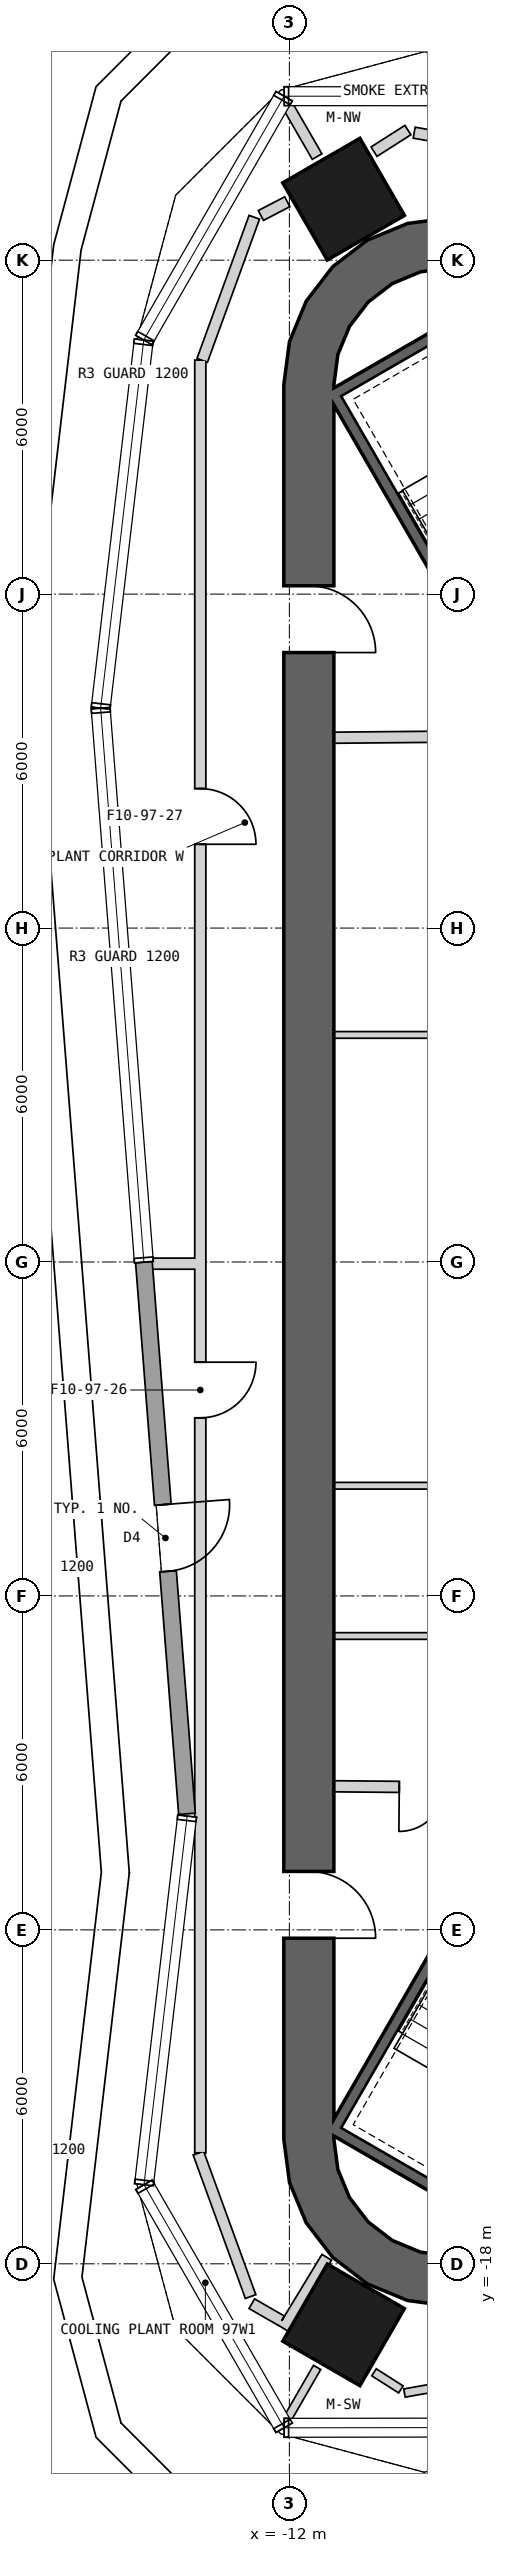
"""IFC4 building model, lengths in metres.
Left out: names, types, materials, properties, quantities, classifications, styles, units other than length and angle.
Written with IfcOpenShell. Run it as: python <this file> out.ifc"""

import sys

from ifc_helpers import new_model, si_unit, direction, frame, frame_2d, origin, origin_2d, place, context, subcontext, project, spatial, polyline, rectangle, outline, extrude, element, fill, save


model = new_model("IFC4")
c1 = context("Model", 3, precision=1e-05, world=origin(), true_north=direction((0.0, 1.0)))
c2 = subcontext(c1, "Body", "Model", "MODEL_VIEW")
j1 = project(units=[si_unit("LENGTHUNIT", "METRE"), si_unit("PLANEANGLEUNIT", "RADIAN")], contexts=[c1])
p1 = place(None, origin())
s1 = spatial("IfcSite", under=j1, at=p1, CompositionType="ELEMENT")
p2 = place(p1, origin())
s2 = spatial("IfcBuilding", under=s1, at=p2, CompositionType="ELEMENT")
p3 = place(p2, frame((0.0, 0.0, 430.3)))
s3 = spatial("IfcBuildingStorey", under=s2, at=p3, CompositionType="ELEMENT", Elevation=430.3)
for number, where, z_axis, x_axis in (
    (1, (-11.025, 19.097, 0.0), (0.0, 0.0, 1.0), (-0.5, 0.866, 0.0)),
    (2, (-11.025, -19.097, 0.0), (0.0, 0.0, 1.0), (-0.5, -0.866, 0.0)),
):
    element("IfcColumn", number, at=place(p3, frame(where, z_axis=z_axis, x_axis=x_axis)), inside=s3, PredefinedType="COLUMN", context=c2, shape_type="SweptSolid", body=[
        extrude(rectangle(XDim=1.6, YDim=1.6, at=origin_2d()), origin(), (0.0, 0.0, 1.0), 5.0),
    ])
p4 = place(p3, frame((-11.65, 15.762, 0.0), z_axis=(0.0, 0.0, 1.0), x_axis=(0.0, -1.0, 0.0)))
e3 = element("IfcWall", 3, at=p4, inside=s3, PredefinedType="SHEAR", context=c2, shape_type="SweptSolid", body=[
    extrude(rectangle(XDim=31.523, YDim=0.9, at=frame_2d((15.762, 0.0))), origin(), (0.0, 0.0, 1.0), 5.0),
])
p5 = place(p4, frame((3.612, 0.0, 0.0)))
e4 = element("IfcOpeningElement", 4, at=p5, cuts=e3, PredefinedType="OPENING", context=c2, shape_type="SweptSolid", body=[
    extrude(rectangle(XDim=1.2, YDim=2.4, at=frame_2d((0.6, 1.2))), frame((0.0, 0.46, 0.0), z_axis=(0.0, -1.0, 0.0), x_axis=(1.0, 0.0, 0.0)), (0.0, 0.0, 1.0), 0.92),
])
p6 = place(p4, frame((26.712, 0.0, 0.0)))
e5 = element("IfcOpeningElement", 5, at=p6, cuts=e3, PredefinedType="OPENING", context=c2, shape_type="SweptSolid", body=[
    extrude(rectangle(XDim=1.2, YDim=2.4, at=frame_2d((0.6, 1.2))), frame((0.0, 0.46, 0.0), z_axis=(0.0, -1.0, 0.0), x_axis=(1.0, 0.0, 0.0)), (0.0, 0.0, 1.0), 0.92),
])
p7 = place(p3, origin())
e6 = element("IfcWall", 6, at=p7, inside=s3, PredefinedType="SHEAR", context=c2, shape_type="SweptSolid", body=[
    extrude(outline(polyline([(-7.6, 18.36), (-8.323, 18.659), (-9.1, 18.762), (-9.876, 18.659), (-10.6, 18.36), (-11.221, 17.883), (-11.698, 17.262), (-11.998, 16.538), (-12.1, 15.762), (-11.2, 15.762), (-11.128, 16.305), (-10.919, 16.812), (-10.585, 17.247), (-10.15, 17.58), (-9.644, 17.79), (-9.1, 17.862), (-8.556, 17.79), (-8.05, 17.58), (-7.6, 18.36)])), origin(), (0.0, 0.0, 1.0), 5.0),
])
p8 = place(p3, origin())
e7 = element("IfcWall", 7, at=p8, inside=s3, PredefinedType="SHEAR", context=c2, shape_type="SweptSolid", body=[
    extrude(outline(polyline([(-12.1, -15.762), (-11.998, -16.538), (-11.698, -17.262), (-11.221, -17.883), (-10.6, -18.36), (-9.876, -18.659), (-9.1, -18.762), (-8.323, -18.659), (-7.6, -18.36), (-8.05, -17.58), (-8.556, -17.79), (-9.1, -17.862), (-9.644, -17.79), (-10.15, -17.58), (-10.585, -17.247), (-10.919, -16.812), (-11.128, -16.305), (-11.2, -15.762), (-12.1, -15.762)])), origin(), (0.0, 0.0, 1.0), 5.0),
])
p9 = place(p3, frame((-14.614, -0.002, 0.0), z_axis=(0.0, 0.0, 1.0), x_axis=(0.077860592968, -0.996964256161, 0.0)))
e8 = element("IfcWall", 8, at=p9, inside=s3, PredefinedType="SOLIDWALL", context=c2, shape_type="SweptSolid", body=[
    extrude(rectangle(XDim=9.943, YDim=0.3, at=frame_2d((4.972, 0.0))), origin(), (0.0, 0.0, 1.0), 4.75),
])
p10 = place(p9, frame((4.372, 0.0, 0.0)))
e9 = element("IfcOpeningElement", 9, at=p10, cuts=e8, PredefinedType="OPENING", context=c2, shape_type="SweptSolid", body=[
    extrude(rectangle(XDim=1.2, YDim=2.4, at=frame_2d((0.6, 1.2))), frame((0.0, 0.16, 0.0), z_axis=(0.0, -1.0, 0.0), x_axis=(1.0, 0.0, 0.0)), (0.0, 0.0, 1.0), 0.32),
])
p11 = place(p3, frame((-11.245, 15.678, -0.25), z_axis=(0.0, 0.0, 1.0), x_axis=(0.499977274689, -0.866038523851, 0.0)))
e10 = element("IfcWall", 10, at=p11, inside=s3, PredefinedType="SHEAR", context=c2, shape_type="SweptSolid", body=[
    extrude(rectangle(XDim=8.1, YDim=0.2, at=frame_2d((4.05, 0.0))), origin(), (0.0, 0.0, 1.0), 5.0),
])
for number, where, z_axis, x_axis in (
    (11, (-7.818, 17.541, -0.25), (0.0, 0.0, 1.0), (-0.866, -0.5, 0.0)),
    (12, (-11.282, -15.541, -0.25), (0.0, 0.0, 1.0), (0.866, -0.5, 0.0)),
):
    element("IfcWall", number, at=place(p3, frame(where, z_axis=z_axis, x_axis=x_axis)), inside=s3, PredefinedType="SHEAR", context=c2, shape_type="SweptSolid", body=[
        extrude(rectangle(XDim=3.8, YDim=0.2, at=frame_2d((1.9, 0.0))), origin(), (0.0, 0.0, 1.0), 5.0),
    ])
p12 = place(p3, frame((-7.196, -8.663, -0.25), z_axis=(0.0, 0.0, 1.0), x_axis=(-0.499997992926, -0.866026562566, 0.0)))
e13 = element("IfcWall", 13, at=p12, inside=s3, PredefinedType="SHEAR", context=c2, shape_type="SweptSolid", body=[
    extrude(rectangle(XDim=7.9, YDim=0.2, at=frame_2d((3.95, 0.0))), origin(), (0.0, 0.0, 1.0), 5.0),
])
p13 = place(p3, frame((-7.95, 4.08, 0.0), z_axis=(0.0, 0.0, 1.0), x_axis=(-1.0, 0.0, 0.0)))
e14 = element("IfcWall", 14, at=p13, inside=s3, PredefinedType="PARTITIONING", context=c2, shape_type="SweptSolid", body=[
    extrude(rectangle(XDim=3.25, YDim=0.12, at=frame_2d((1.625, 0.0))), origin(), (0.0, 0.0, 1.0), 4.75),
])
p14 = place(p3, frame((-7.85, 9.451, 0.0), z_axis=(0.0, 0.0, 1.0), x_axis=(-0.999957167047, -0.009255488683, 0.0)))
e15 = element("IfcWall", 15, at=p14, inside=s3, PredefinedType="PARTITIONING", context=c2, shape_type="SweptSolid", body=[
    extrude(rectangle(XDim=3.35, YDim=0.2, at=frame_2d((1.675, 0.0))), origin(), (0.0, 0.0, 1.0), 4.75),
])
for number, where, z_axis, x_axis in (
    (16, (-11.2, -4.02, 0.0), (0.0, 0.0, 1.0), (1.0, 0.0, 0.0)),
    (17, (-11.2, -6.72, 0.0), (0.0, 0.0, 1.0), (1.0, 0.0, 0.0)),
):
    element("IfcWall", number, at=place(p3, frame(where, z_axis=z_axis, x_axis=x_axis)), inside=s3, PredefinedType="PARTITIONING", context=c2, shape_type="SweptSolid", body=[
        extrude(rectangle(XDim=3.25, YDim=0.12, at=frame_2d((1.625, 0.0))), origin(), (0.0, 0.0, 1.0), 4.75),
    ])
p15 = place(p3, frame((-11.2, -9.42, 0.0), z_axis=(0.0, 0.0, 1.0), x_axis=(0.999957467379, -0.009222983926, 0.0)))
e18 = element("IfcWall", 18, at=p15, inside=s3, PredefinedType="PARTITIONING", context=c2, shape_type="SweptSolid", body=[
    extrude(rectangle(XDim=3.15, YDim=0.2, at=frame_2d((1.575, 0.0))), origin(), (0.0, 0.0, 1.0), 4.75),
])
p16 = place(p15, frame((1.175, 0.0, 0.0)))
e19 = element("IfcOpeningElement", 19, at=p16, cuts=e18, PredefinedType="OPENING", context=c2, shape_type="SweptSolid", body=[
    extrude(rectangle(XDim=0.8, YDim=2.1, at=frame_2d((0.4, 1.05))), frame((0.0, 0.11, 0.0), z_axis=(0.0, -1.0, 0.0), x_axis=(1.0, 0.0, 0.0)), (0.0, 0.0, 1.0), 0.22),
])
p17 = place(p3, frame((-12.104, -19.161, 0.0), z_axis=(0.0, 0.0, 1.0), x_axis=(0.518475368733, 0.855092563421, 0.0)))
e20 = element("IfcWall", 20, at=p17, inside=s3, PredefinedType="PARTITIONING", context=c2, shape_type="SweptSolid", body=[
    extrude(rectangle(XDim=1.496, YDim=0.2, at=frame_2d((0.748, 0.0))), origin(), (0.0, 0.0, 1.0), 4.75),
])
p18 = place(p3, frame((-12.675, -18.717, 0.0), z_axis=(0.0, 0.0, 1.0), x_axis=(0.866047486323, -0.49996174997, 0.0)))
e21 = element("IfcWall", 21, at=p18, inside=s3, PredefinedType="PARTITIONING", context=c2, shape_type="SweptSolid", body=[
    extrude(rectangle(XDim=0.618, YDim=0.2, at=frame_2d((0.309, 0.0))), origin(), (0.0, 0.0, 1.0), 4.75),
])
p19 = place(p3, frame((-13.634, -16.011, 0.0), z_axis=(0.0, 0.0, 1.0), x_axis=(0.342043269434, -0.939684203248, 0.0)))
e22 = element("IfcWall", 22, at=p19, inside=s3, PredefinedType="PARTITIONING", context=c2, shape_type="SweptSolid", body=[
    extrude(rectangle(XDim=2.742, YDim=0.2, at=frame_2d((1.371, 0.0))), origin(), (0.0, 0.0, 1.0), 4.75),
])
p20 = place(p3, frame((-13.6, 16.206, 0.0), z_axis=(0.0, 0.0, 1.0), x_axis=(0.0, -1.0, 0.0)))
e23 = element("IfcWall", 23, at=p20, inside=s3, PredefinedType="PARTITIONING", context=c2, shape_type="SweptSolid", body=[
    extrude(rectangle(XDim=16.256, YDim=0.2, at=frame_2d((8.128, 0.0))), origin(), (0.0, 0.0, 1.0), 4.75),
])
p21 = place(p20, frame((7.7, 0.0, 0.0)))
e24 = element("IfcOpeningElement", 24, at=p21, cuts=e23, PredefinedType="OPENING", context=c2, shape_type="SweptSolid", body=[
    extrude(rectangle(XDim=1.0, YDim=2.1, at=frame_2d((0.5, 1.05))), frame((0.0, 0.11, 0.0), z_axis=(0.0, -1.0, 0.0), x_axis=(1.0, 0.0, 0.0)), (0.0, 0.0, 1.0), 0.22),
])
p22 = place(p3, frame((-13.6, -0.05, 0.0), z_axis=(0.0, 0.0, 1.0), x_axis=(0.0, -1.0, 0.0)))
e25 = element("IfcWall", 25, at=p22, inside=s3, PredefinedType="PARTITIONING", context=c2, shape_type="SweptSolid", body=[
    extrude(rectangle(XDim=15.956, YDim=0.2, at=frame_2d((7.978, 0.0))), origin(), (0.0, 0.0, 1.0), 4.75),
])
p23 = place(p22, frame((1.75, 0.0, 0.0)))
e26 = element("IfcOpeningElement", 26, at=p23, cuts=e25, PredefinedType="OPENING", context=c2, shape_type="SweptSolid", body=[
    extrude(rectangle(XDim=1.0, YDim=2.1, at=frame_2d((0.5, 1.05))), frame((0.0, 0.11, 0.0), z_axis=(0.0, -1.0, 0.0), x_axis=(1.0, 0.0, 0.0)), (0.0, 0.0, 1.0), 0.22),
])
p24 = place(p3, frame((-12.63, 18.771, 0.0), z_axis=(0.0, 0.0, 1.0), x_axis=(-0.342015224264, -0.939694411163, 0.0)))
e27 = element("IfcWall", 27, at=p24, inside=s3, PredefinedType="PARTITIONING", context=c2, shape_type="SweptSolid", body=[
    extrude(rectangle(XDim=2.737, YDim=0.2, at=frame_2d((1.368, 0.0))), origin(), (0.0, 0.0, 1.0), 4.75),
])
p25 = place(p3, frame((-12.038, 19.05, 0.0), z_axis=(0.0, 0.0, 1.0), x_axis=(-0.887186880255, -0.461410272429, 0.0)))
e28 = element("IfcWall", 28, at=p25, inside=s3, PredefinedType="PARTITIONING", context=c2, shape_type="SweptSolid", body=[
    extrude(rectangle(XDim=0.534, YDim=0.2, at=frame_2d((0.267, 0.0))), origin(), (0.0, 0.0, 1.0), 4.75),
])
p26 = place(p3, frame((-14.486, -0.03, 0.0), z_axis=(0.0, 0.0, 1.0), x_axis=(1.0, 0.0, 0.0)))
e29 = element("IfcWall", 29, at=p26, inside=s3, PredefinedType="PARTITIONING", context=c2, shape_type="SweptSolid", body=[
    extrude(rectangle(XDim=0.786, YDim=0.2, at=frame_2d((0.393, 0.0))), origin(), (0.0, 0.0, 1.0), 4.75),
])
p27 = place(p3, frame((-11.501, -19.861, 0.0), z_axis=(0.0, 0.0, 1.0), x_axis=(-0.500107244371, -0.865963477364, 0.0)))
e30 = element("IfcWall", 30, at=p27, inside=s3, PredefinedType="PLUMBINGWALL", context=c2, shape_type="SweptSolid", body=[
    extrude(rectangle(XDim=1.098, YDim=0.15, at=frame_2d((0.549, 0.0))), origin(), (0.0, 0.0, 1.0), 3.93),
])
p28 = place(p3, frame((-11.501, 19.861, 0.0), z_axis=(0.0, 0.0, 1.0), x_axis=(-0.500107244371, 0.865963477364, 0.0)))
e31 = element("IfcWall", 31, at=p28, inside=s3, PredefinedType="PARTITIONING", context=c2, shape_type="SweptSolid", body=[
    extrude(rectangle(XDim=1.098, YDim=0.2, at=frame_2d((0.549, 0.0))), origin(), (0.0, 0.0, 1.0), 3.93),
])
p29 = place(p3, frame((-9.87, 20.337, 0.0), z_axis=(0.0, 0.0, 1.0), x_axis=(-0.843326891705, -0.537400924569, 0.0)))
e32 = element("IfcWall", 32, at=p29, inside=s3, PredefinedType="PARTITIONING", context=c2, shape_type="SweptSolid", body=[
    extrude(rectangle(XDim=0.721, YDim=0.2, at=frame_2d((0.361, 0.0))), origin(), (0.0, 0.0, 1.0), 4.75),
])
p30 = place(p3, frame((-7.246, 19.848, 0.0), z_axis=(0.0, 0.0, 1.0), x_axis=(-0.984816315713, 0.173599609177, 0.0)))
e33 = element("IfcWall", 33, at=p30, inside=s3, PredefinedType="PARTITIONING", context=c2, shape_type="SweptSolid", body=[
    extrude(rectangle(XDim=2.55, YDim=0.2, at=frame_2d((1.275, 0.0))), origin(), (0.0, 0.0, 1.0), 4.75),
])
p31 = place(p3, frame((-9.932, -20.322, 0.0), z_axis=(0.0, 0.0, 1.0), x_axis=(0.984813908974, 0.173613261856, 0.0)))
e34 = element("IfcWall", 34, at=p31, inside=s3, PredefinedType="PLUMBINGWALL", context=c2, shape_type="SweptSolid", body=[
    extrude(rectangle(XDim=2.752, YDim=0.15, at=frame_2d((1.376, 0.0))), origin(), (0.0, 0.0, 1.0), 4.75),
])
p32 = place(p3, frame((-10.479, -19.95, 0.0), z_axis=(0.0, 0.0, 1.0), x_axis=(0.843309487859, -0.537428234917, 0.0)))
e35 = element("IfcWall", 35, at=p32, inside=s3, PredefinedType="PLUMBINGWALL", context=c2, shape_type="SweptSolid", body=[
    extrude(rectangle(XDim=0.572, YDim=0.15, at=frame_2d((0.286, 0.0))), origin(), (0.0, 0.0, 1.0), 4.75),
])
p33 = place(p10, frame((1.2, 0.0, 0.0), z_axis=(0.0, 0.0, 1.0), x_axis=(-1.0, 0.0, 0.0)))
e36 = element("IfcDoor", 36, at=p33, inside=s3, OperationType="SINGLE_SWING_RIGHT", PredefinedType="DOOR", context=c2, shape_type="SweptSolid", body=[
    extrude(rectangle(XDim=1.2, YDim=2.4, at=frame_2d((0.6, 1.2))), frame((0.0, 0.025, 0.0), z_axis=(0.0, -1.0, 0.0), x_axis=(1.0, 0.0, 0.0)), (0.0, 0.0, 1.0), 0.05),
])
fill(e9, e36)
p34 = place(p16, origin())
e37 = element("IfcDoor", 37, at=p34, inside=s3, OperationType="SINGLE_SWING_LEFT", PredefinedType="USERDEFINED", context=c2, shape_type="SweptSolid", body=[
    extrude(rectangle(XDim=0.8, YDim=2.1, at=frame_2d((0.4, 1.05))), frame((0.0, 0.025, 0.0), z_axis=(0.0, -1.0, 0.0), x_axis=(1.0, 0.0, 0.0)), (0.0, 0.0, 1.0), 0.05),
])
fill(e19, e37)
p35 = place(p23, origin())
e38 = element("IfcDoor", 38, at=p35, inside=s3, OperationType="SINGLE_SWING_LEFT", PredefinedType="USERDEFINED", context=c2, shape_type="SweptSolid", body=[
    extrude(rectangle(XDim=1.0, YDim=2.1, at=frame_2d((0.5, 1.05))), frame((0.0, 0.025, 0.0), z_axis=(0.0, -1.0, 0.0), x_axis=(1.0, 0.0, 0.0)), (0.0, 0.0, 1.0), 0.05),
])
fill(e26, e38)
p36 = place(p21, origin())
e39 = element("IfcDoor", 39, at=p36, inside=s3, OperationType="SINGLE_SWING_RIGHT", PredefinedType="USERDEFINED", context=c2, shape_type="SweptSolid", body=[
    extrude(rectangle(XDim=1.0, YDim=2.1, at=frame_2d((0.5, 1.05))), frame((0.0, 0.025, 0.0), z_axis=(0.0, -1.0, 0.0), x_axis=(1.0, 0.0, 0.0)), (0.0, 0.0, 1.0), 0.05),
])
fill(e24, e39)
p37 = place(p5, origin())
e40 = element("IfcDoor", 40, at=p37, inside=s3, OperationType="SINGLE_SWING_RIGHT", PredefinedType="USERDEFINED", context=c2, shape_type="SweptSolid", body=[
    extrude(rectangle(XDim=1.2, YDim=2.4, at=frame_2d((0.6, 1.2))), frame((0.0, 0.025, 0.0), z_axis=(0.0, -1.0, 0.0), x_axis=(1.0, 0.0, 0.0)), (0.0, 0.0, 1.0), 0.05),
])
fill(e4, e40)
p38 = place(p6, origin())
e41 = element("IfcDoor", 41, at=p38, inside=s3, OperationType="SINGLE_SWING_RIGHT", PredefinedType="USERDEFINED", context=c2, shape_type="SweptSolid", body=[
    extrude(rectangle(XDim=1.2, YDim=2.4, at=frame_2d((0.6, 1.2))), frame((0.0, 0.025, 0.0), z_axis=(0.0, -1.0, 0.0), x_axis=(1.0, 0.0, 0.0)), (0.0, 0.0, 1.0), 0.05),
])
fill(e5, e41)
save(model, sys.argv[1])
